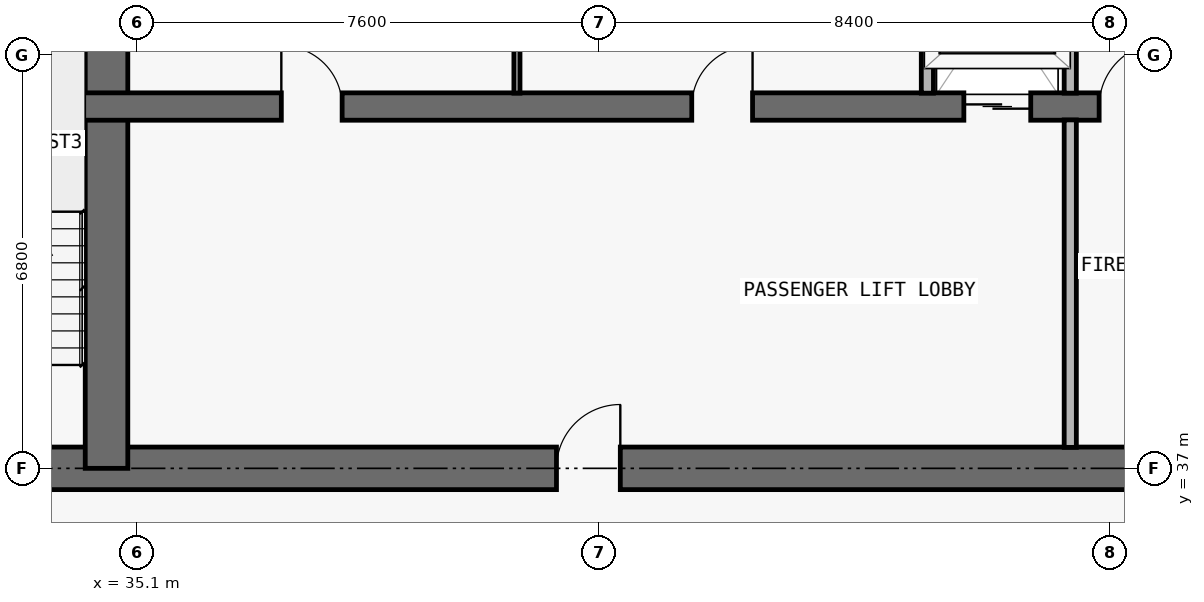
"""IFC4 building model, lengths in metres.
Left out: names, types, materials, properties, quantities, classifications, styles, units other than length and angle.
Written with IfcOpenShell. Run it as: python <this file> out.ifc"""

import sys

from ifc_helpers import new_model, si_unit, direction, frame, frame_2d, origin, place, context, subcontext, project, spatial, rectangle, extrude, element, fill, save


model = new_model("IFC4")
c1 = context("Model", 3, precision=1e-05, world=origin(), true_north=direction((0.0, 1.0)))
c2 = subcontext(c1, "Body", "Model", "MODEL_VIEW")
j1 = project(units=[si_unit("LENGTHUNIT", "METRE"), si_unit("PLANEANGLEUNIT", "RADIAN")], contexts=[c1])
p1 = place(None, origin())
s1 = spatial("IfcSite", under=j1, at=p1, CompositionType="ELEMENT")
p2 = place(p1, origin())
s2 = spatial("IfcBuilding", under=s1, at=p2, CompositionType="ELEMENT")
p3 = place(p2, frame((0.0, 0.0, 239.7)))
s3 = spatial("IfcBuildingStorey", under=s2, at=p3, CompositionType="ELEMENT", Elevation=239.7)
p4 = place(p3, frame((17.95, 37.0, 0.0), z_axis=(0.0, 0.0, 1.0), x_axis=(1.0, 0.0, 0.0)))
e1 = element("IfcWall", 1, at=p4, inside=s3, PredefinedType="SHEAR", context=c2, shape_type="SweptSolid", body=[
    extrude(rectangle(XDim=41.9, YDim=0.7, at=frame_2d((20.95, 0.0))), origin(), (0.0, 0.0, 1.0), 3.05),
])
p5 = place(p4, frame((14.35, 0.0, 0.0)))
e2 = element("IfcOpeningElement", 2, at=p5, cuts=e1, PredefinedType="OPENING", context=c2, shape_type="SweptSolid", body=[
    extrude(rectangle(XDim=1.1, YDim=2.15, at=frame_2d((0.55, 1.075))), frame((0.0, 0.36, 0.0), z_axis=(0.0, -1.0, 0.0), x_axis=(1.0, 0.0, 0.0)), (0.0, 0.0, 1.0), 0.72),
])
p6 = place(p4, frame((6.2, 0.0, 0.0)))
e3 = element("IfcOpeningElement", 3, at=p6, cuts=e1, PredefinedType="OPENING", context=c2, shape_type="SweptSolid", body=[
    extrude(rectangle(XDim=1.05, YDim=2.15, at=frame_2d((0.525, 1.075))), frame((0.0, 0.36, 0.0), z_axis=(0.0, -1.0, 0.0), x_axis=(1.0, 0.0, 0.0)), (0.0, 0.0, 1.0), 0.72),
])
p7 = place(p4, frame((34.7, 0.0, 0.0)))
e4 = element("IfcOpeningElement", 4, at=p7, cuts=e1, PredefinedType="OPENING", context=c2, shape_type="SweptSolid", body=[
    extrude(rectangle(XDim=1.05, YDim=2.15, at=frame_2d((0.525, 1.075))), frame((0.0, 0.36, 0.0), z_axis=(0.0, -1.0, 0.0), x_axis=(1.0, 0.0, 0.0)), (0.0, 0.0, 1.0), 0.72),
])
p8 = place(p4, frame((10.812, 0.0, 0.0)))
e5 = element("IfcOpeningElement", 5, at=p8, cuts=e1, PredefinedType="OPENING", context=c2, shape_type="SweptSolid", body=[
    extrude(rectangle(XDim=1.05, YDim=2.15, at=frame_2d((0.525, 1.075))), frame((0.0, 0.36, 0.0), z_axis=(0.0, -1.0, 0.0), x_axis=(1.0, 0.0, 0.0)), (0.0, 0.0, 1.0), 0.72),
])
p9 = place(p4, frame((24.05, 0.0, 0.0)))
e6 = element("IfcOpeningElement", 6, at=p9, cuts=e1, PredefinedType="OPENING", context=c2, shape_type="SweptSolid", body=[
    extrude(rectangle(XDim=1.05, YDim=2.15, at=frame_2d((0.525, 1.075))), frame((0.0, 0.36, 0.0), z_axis=(0.0, -1.0, 0.0), x_axis=(1.0, 0.0, 0.0)), (0.0, 0.0, 1.0), 0.72),
])
p10 = place(p3, frame((34.6, 37.0, 0.0), z_axis=(0.0, 0.0, 1.0), x_axis=(0.0, 1.0, 0.0)))
e7 = element("IfcWall", 7, at=p10, inside=s3, PredefinedType="SHEAR", context=c2, shape_type="SweptSolid", body=[
    extrude(rectangle(XDim=9.575, YDim=0.7, at=frame_2d((4.788, 0.0))), origin(), (0.0, 0.0, 1.0), 3.05),
])
p11 = place(p3, frame((22.25, 42.95, 0.0), z_axis=(0.0, 0.0, 1.0), x_axis=(1.0, 0.0, 0.0)))
e8 = element("IfcWall", 8, at=p11, inside=s3, PredefinedType="SHEAR", context=c2, shape_type="SweptSolid", body=[
    extrude(rectangle(XDim=33.3, YDim=0.45, at=frame_2d((16.65, 0.0))), origin(), (0.0, 0.0, 1.0), 3.05),
])
p12 = place(p11, frame((1.05, 0.0, 0.0)))
e9 = element("IfcOpeningElement", 9, at=p12, cuts=e8, PredefinedType="OPENING", context=c2, shape_type="SweptSolid", body=[
    extrude(rectangle(XDim=1.2, YDim=2.2, at=frame_2d((0.6, 1.1))), frame((0.0, 0.235, 0.0), z_axis=(0.0, -1.0, 0.0), x_axis=(1.0, 0.0, 0.0)), (0.0, 0.0, 1.0), 0.47),
])
p13 = place(p11, frame((31.05, 0.0, 0.0)))
e10 = element("IfcOpeningElement", 10, at=p13, cuts=e8, PredefinedType="OPENING", context=c2, shape_type="SweptSolid", body=[
    extrude(rectangle(XDim=1.2, YDim=2.2, at=frame_2d((0.6, 1.1))), frame((0.0, 0.235, 0.0), z_axis=(0.0, -1.0, 0.0), x_axis=(1.0, 0.0, 0.0)), (0.0, 0.0, 1.0), 0.47),
])
p14 = place(p11, frame((26.45, 0.0, 0.0)))
e11 = element("IfcOpeningElement", 11, at=p14, cuts=e8, PredefinedType="OPENING", context=c2, shape_type="SweptSolid", body=[
    extrude(rectangle(XDim=1.1, YDim=2.2, at=frame_2d((0.55, 1.1))), frame((0.0, 0.235, 0.0), z_axis=(0.0, -1.0, 0.0), x_axis=(1.0, 0.0, 0.0)), (0.0, 0.0, 1.0), 0.47),
])
p15 = place(p11, frame((5.95, 0.0, 0.0)))
e12 = element("IfcOpeningElement", 12, at=p15, cuts=e8, PredefinedType="OPENING", context=c2, shape_type="SweptSolid", body=[
    extrude(rectangle(XDim=1.1, YDim=2.2, at=frame_2d((0.55, 1.1))), frame((0.0, 0.235, 0.0), z_axis=(0.0, -1.0, 0.0), x_axis=(1.0, 0.0, 0.0)), (0.0, 0.0, 1.0), 0.47),
])
p16 = place(p11, frame((3.625, 0.0, 0.0)))
e13 = element("IfcOpeningElement", 13, at=p16, cuts=e8, PredefinedType="OPENING", context=c2, shape_type="SweptSolid", body=[
    extrude(rectangle(XDim=1.05, YDim=2.15, at=frame_2d((0.525, 1.075))), frame((0.0, 0.235, 0.0), z_axis=(0.0, -1.0, 0.0), x_axis=(1.0, 0.0, 0.0)), (0.0, 0.0, 1.0), 0.47),
])
p17 = place(p11, frame((28.675, 0.0, 0.0)))
e14 = element("IfcOpeningElement", 14, at=p17, cuts=e8, PredefinedType="OPENING", context=c2, shape_type="SweptSolid", body=[
    extrude(rectangle(XDim=1.05, YDim=2.15, at=frame_2d((0.525, 1.075))), frame((0.0, 0.235, 0.0), z_axis=(0.0, -1.0, 0.0), x_axis=(1.0, 0.0, 0.0)), (0.0, 0.0, 1.0), 0.47),
])
p18 = place(p11, frame((15.225, 0.0, 0.0)))
e15 = element("IfcOpeningElement", 15, at=p18, cuts=e8, PredefinedType="OPENING", context=c2, shape_type="SweptSolid", body=[
    extrude(rectangle(XDim=1.0, YDim=2.2, at=frame_2d((0.5, 1.1))), frame((0.0, 0.235, 0.0), z_axis=(0.0, -1.0, 0.0), x_axis=(1.0, 0.0, 0.0)), (0.0, 0.0, 1.0), 0.47),
])
p19 = place(p11, frame((21.975, 0.0, 0.0)))
e16 = element("IfcOpeningElement", 16, at=p19, cuts=e8, PredefinedType="OPENING", context=c2, shape_type="SweptSolid", body=[
    extrude(rectangle(XDim=1.0, YDim=2.2, at=frame_2d((0.5, 1.1))), frame((0.0, 0.235, 0.0), z_axis=(0.0, -1.0, 0.0), x_axis=(1.0, 0.0, 0.0)), (0.0, 0.0, 1.0), 0.47),
])
p20 = place(p3, frame((41.35, 43.17, 0.0), z_axis=(0.0, 0.0, 1.0), x_axis=(0.0, 1.0, 0.0)))
e17 = element("IfcWall", 17, at=p20, inside=s3, PredefinedType="MOVABLE", context=c2, shape_type="SweptSolid", body=[
    extrude(rectangle(XDim=3.185, YDim=0.1, at=frame_2d((1.593, 0.0))), origin(), (0.0, 0.0, 1.0), 3.05),
])
p21 = place(p3, frame((48.1, 43.17, 0.0), z_axis=(0.0, 0.0, 1.0), x_axis=(0.0, 1.0, 0.0)))
e18 = element("IfcWall", 18, at=p21, inside=s3, PredefinedType="PARTITIONING", context=c2, shape_type="SweptSolid", body=[
    extrude(rectangle(XDim=3.185, YDim=0.2, at=frame_2d((1.593, 0.0))), origin(), (0.0, 0.0, 1.0), 3.05),
])
p22 = place(p3, frame((50.45, 37.345, 0.0), z_axis=(0.0, 0.0, 1.0), x_axis=(0.0, 1.0, 0.0)))
e19 = element("IfcWall", 19, at=p22, inside=s3, PredefinedType="PARTITIONING", context=c2, shape_type="SweptSolid", body=[
    extrude(rectangle(XDim=5.385, YDim=0.2, at=frame_2d((2.692, 0.0))), origin(), (0.0, 0.0, 1.0), 3.05),
])
p23 = place(p3, frame((50.45, 43.17, 0.0), z_axis=(0.0, 0.0, 1.0), x_axis=(0.0, 1.0, 0.0)))
e20 = element("IfcWall", 20, at=p23, inside=s3, PredefinedType="PARTITIONING", context=c2, shape_type="SweptSolid", body=[
    extrude(rectangle(XDim=3.185, YDim=0.2, at=frame_2d((1.593, 0.0))), origin(), (0.0, 0.0, 1.0), 3.05),
])
p24 = place(p14, origin())
e21 = element("IfcDoor", 21, at=p24, inside=s3, OperationType="DOUBLE_DOOR_SLIDING", PredefinedType="DOOR", context=c2, shape_type="SweptSolid", body=[
    extrude(rectangle(XDim=1.1, YDim=2.2, at=frame_2d((0.55, 1.1))), frame((0.0, 0.025, 0.0), z_axis=(0.0, -1.0, 0.0), x_axis=(1.0, 0.0, 0.0)), (0.0, 0.0, 1.0), 0.05),
])
fill(e11, e21)
p25 = place(p17, origin())
e22 = element("IfcDoor", 22, at=p25, inside=s3, OperationType="SINGLE_SWING_RIGHT", PredefinedType="DOOR", context=c2, shape_type="SweptSolid", body=[
    extrude(rectangle(XDim=1.05, YDim=2.15, at=frame_2d((0.525, 1.075))), frame((0.0, 0.025, 0.0), z_axis=(0.0, -1.0, 0.0), x_axis=(1.0, 0.0, 0.0)), (0.0, 0.0, 1.0), 0.05),
])
fill(e14, e22)
p26 = place(p9, origin())
e23 = element("IfcDoor", 23, at=p26, inside=s3, OperationType="SINGLE_SWING_RIGHT", PredefinedType="DOOR", context=c2, shape_type="SweptSolid", body=[
    extrude(rectangle(XDim=1.05, YDim=2.15, at=frame_2d((0.525, 1.075))), frame((0.0, 0.025, 0.0), z_axis=(0.0, -1.0, 0.0), x_axis=(1.0, 0.0, 0.0)), (0.0, 0.0, 1.0), 0.05),
])
fill(e6, e23)
p27 = place(p18, origin())
e24 = element("IfcDoor", 24, at=p27, inside=s3, OperationType="SINGLE_SWING_LEFT", PredefinedType="DOOR", context=c2, shape_type="SweptSolid", body=[
    extrude(rectangle(XDim=1.0, YDim=2.2, at=frame_2d((0.5, 1.1))), frame((0.0, 0.025, 0.0), z_axis=(0.0, -1.0, 0.0), x_axis=(1.0, 0.0, 0.0)), (0.0, 0.0, 1.0), 0.05),
])
fill(e15, e24)
p28 = place(p19, origin())
e25 = element("IfcDoor", 25, at=p28, inside=s3, OperationType="SINGLE_SWING_RIGHT", PredefinedType="DOOR", context=c2, shape_type="SweptSolid", body=[
    extrude(rectangle(XDim=1.0, YDim=2.2, at=frame_2d((0.5, 1.1))), frame((0.0, 0.025, 0.0), z_axis=(0.0, -1.0, 0.0), x_axis=(1.0, 0.0, 0.0)), (0.0, 0.0, 1.0), 0.05),
])
fill(e16, e25)
save(model, sys.argv[1])
